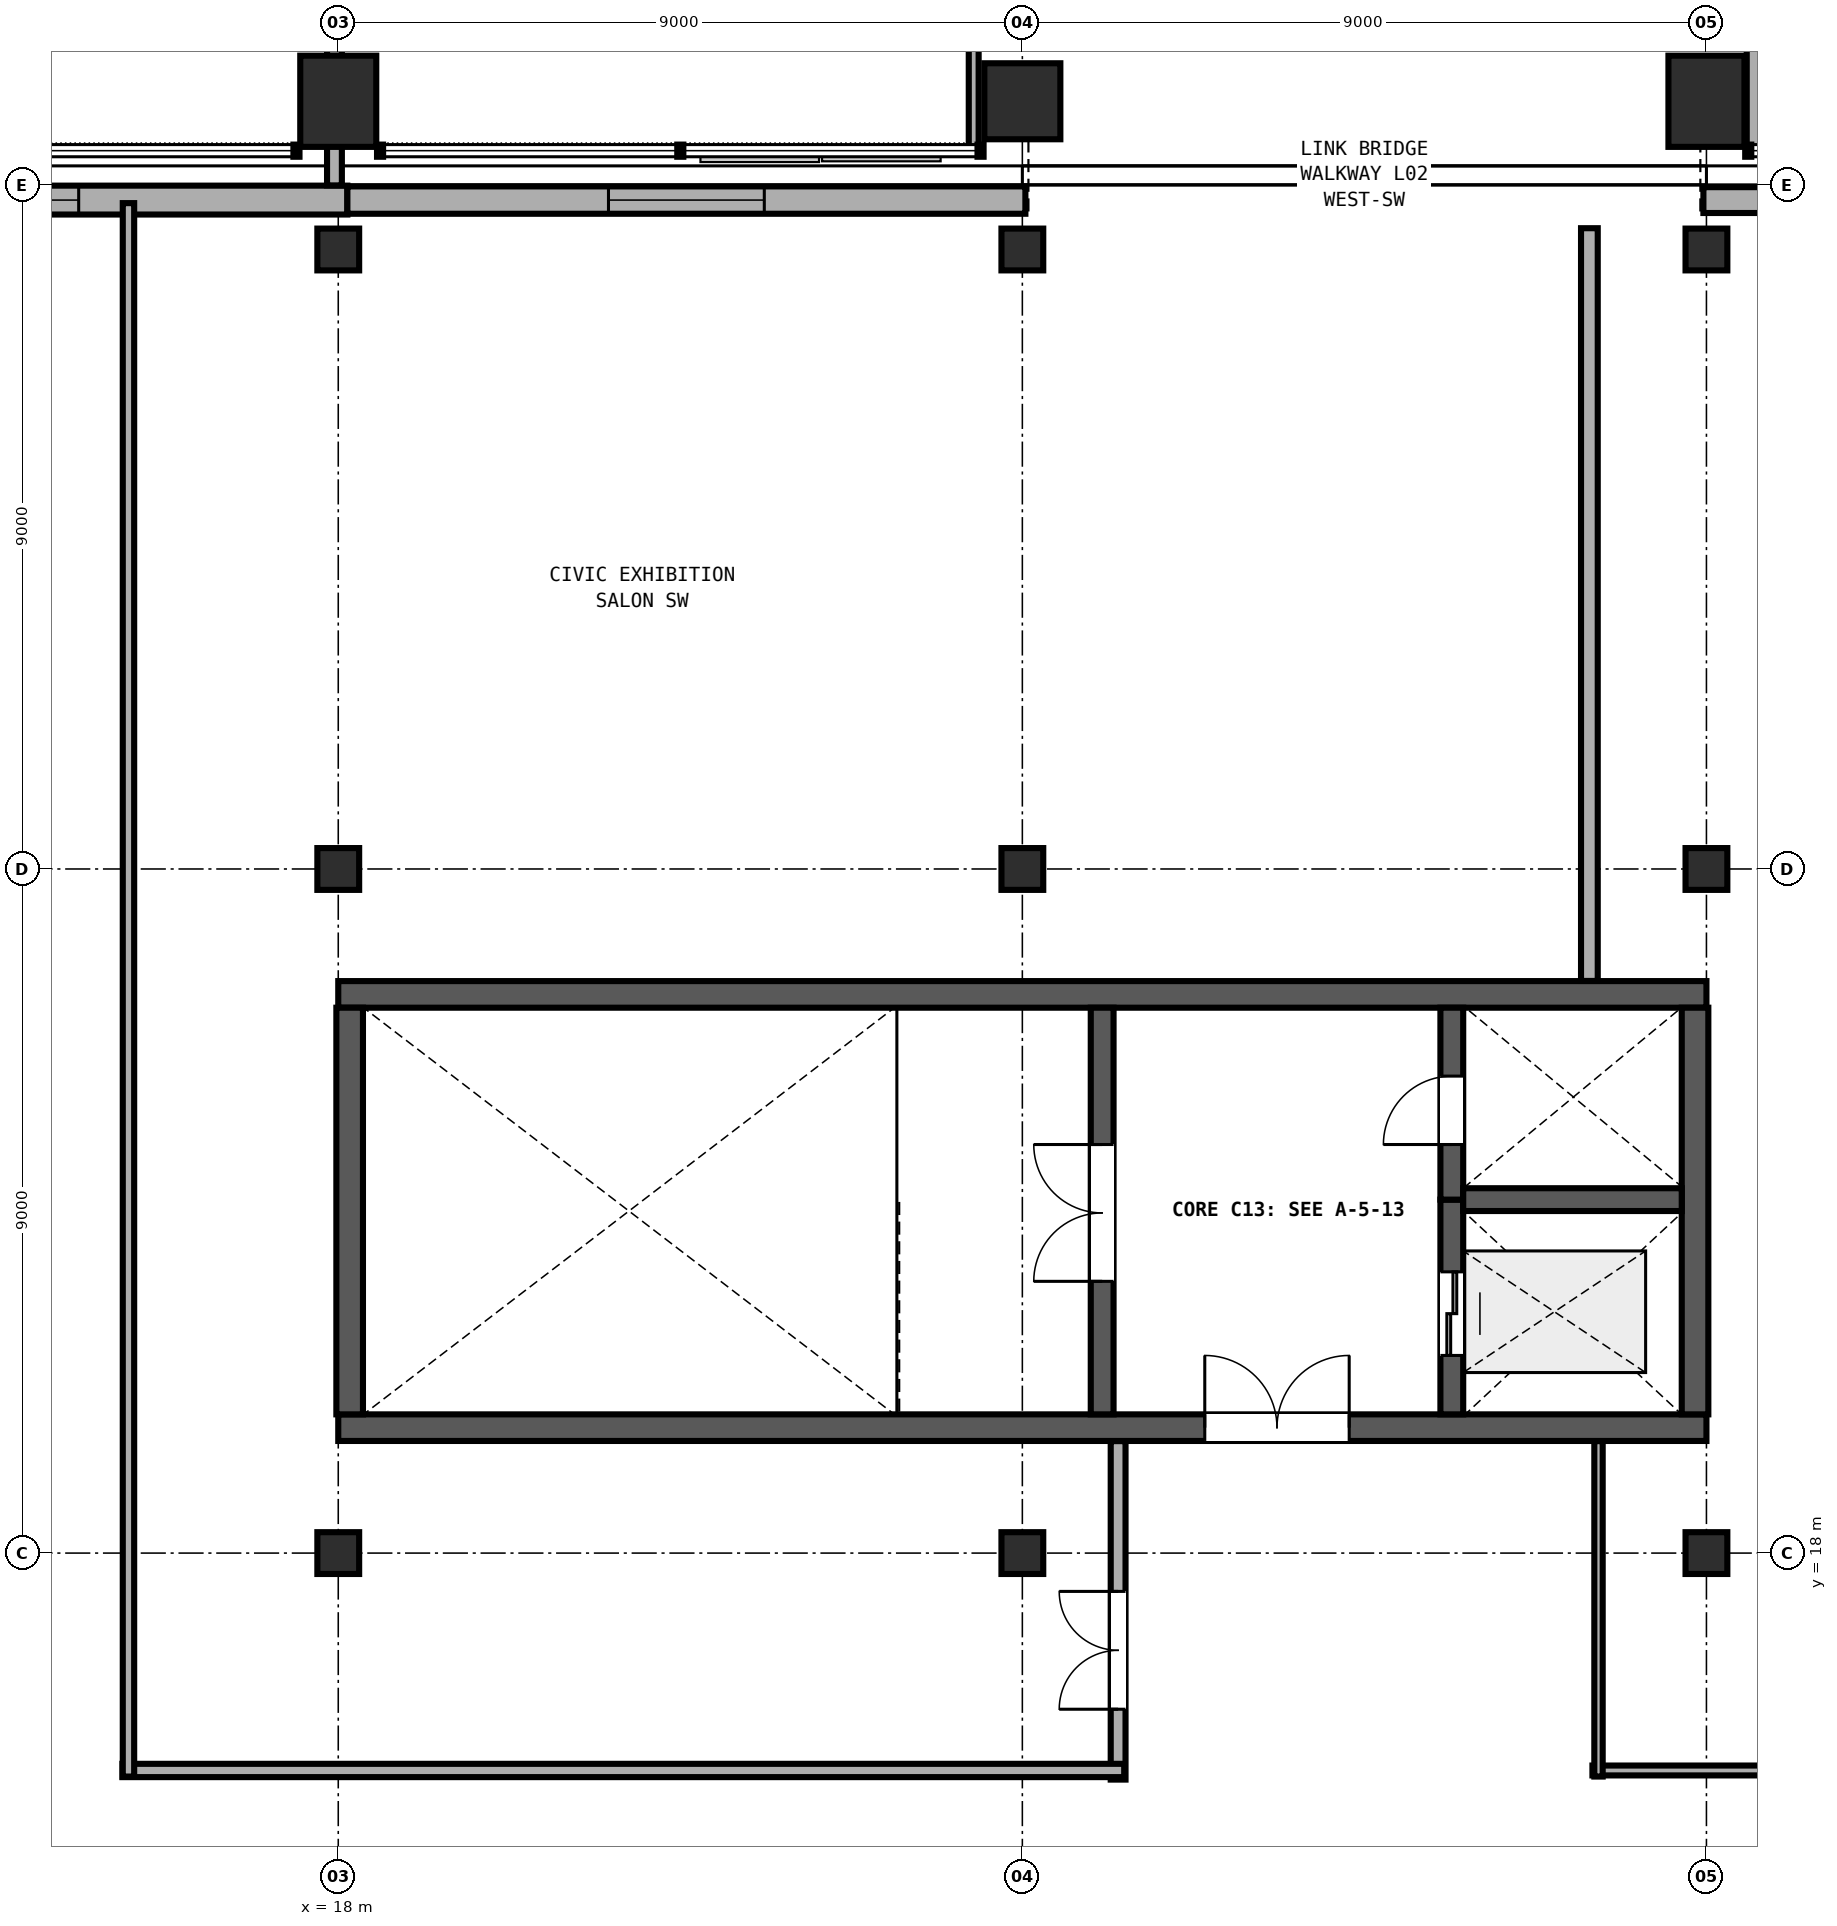
"""IFC4 building model, lengths in metres.
Left out: names, types, materials, properties, quantities, classifications, styles, units other than length and angle.
Written with IfcOpenShell. Run it as: python <this file> out.ifc"""

import sys

from ifc_helpers import new_model, si_unit, direction, frame, frame_2d, origin, origin_2d, place, context, subcontext, project, spatial, rectangle, extrude, element, fill, save


model = new_model("IFC4")
c1 = context("Model", 3, precision=1e-05, world=origin(), true_north=direction((0.0, 1.0)))
c2 = subcontext(c1, "Body", "Model", "MODEL_VIEW")
j1 = project(units=[si_unit("LENGTHUNIT", "METRE"), si_unit("PLANEANGLEUNIT", "RADIAN")], contexts=[c1])
p1 = place(None, origin())
s1 = spatial("IfcSite", under=j1, at=p1, CompositionType="ELEMENT")
p2 = place(p1, origin())
s2 = spatial("IfcBuilding", under=s1, at=p2, CompositionType="ELEMENT")
p3 = place(p2, frame((0.0, 0.0, 9.6)))
s3 = spatial("IfcBuildingStorey", under=s2, at=p3, CompositionType="ELEMENT", Elevation=9.6)
p4 = place(p3, frame((18.0, 37.1, 0.0), z_axis=(0.0, 0.0, 1.0), x_axis=(1.0, 0.0, 0.0)))
e1 = element("IfcColumn", 1, at=p4, inside=s3, PredefinedType="COLUMN", context=c2, shape_type="SweptSolid", body=[
    extrude(rectangle(XDim=1.0, YDim=1.2, at=origin_2d()), origin(), (0.0, 0.0, 1.0), 4.8),
])
p5 = place(p3, frame((27.0, 37.1, 0.0), z_axis=(0.0, 0.0, 1.0), x_axis=(1.0, 0.0, 0.0)))
e2 = element("IfcColumn", 2, at=p5, inside=s3, PredefinedType="COLUMN", context=c2, shape_type="SweptSolid", body=[
    extrude(rectangle(XDim=1.0, YDim=1.0, at=origin_2d()), origin(), (0.0, 0.0, 1.0), 4.8),
])
p6 = place(p3, frame((36.0, 37.1, 0.0), z_axis=(0.0, 0.0, 1.0), x_axis=(1.0, 0.0, 0.0)))
e3 = element("IfcColumn", 3, at=p6, inside=s3, PredefinedType="COLUMN", context=c2, shape_type="SweptSolid", body=[
    extrude(rectangle(XDim=1.0, YDim=1.2, at=origin_2d()), origin(), (0.0, 0.0, 1.0), 4.8),
])
for number, where, z_axis, x_axis in (
    (4, (18.0, 18.0, 0.0), (0.0, 0.0, 1.0), (1.0, 0.0, 0.0)),
    (5, (18.0, 27.0, 0.0), (0.0, 0.0, 1.0), (1.0, 0.0, 0.0)),
    (6, (18.0, 35.15, 0.0), (0.0, 0.0, 1.0), (1.0, 0.0, 0.0)),
    (7, (27.0, 18.0, 0.0), (0.0, 0.0, 1.0), (1.0, 0.0, 0.0)),
    (8, (27.0, 27.0, 0.0), (0.0, 0.0, 1.0), (1.0, 0.0, 0.0)),
    (9, (27.0, 35.15, 0.0), (0.0, 0.0, 1.0), (1.0, 0.0, 0.0)),
    (10, (36.0, 18.0, 0.0), (0.0, 0.0, 1.0), (1.0, 0.0, 0.0)),
    (11, (36.0, 27.0, 0.0), (0.0, 0.0, 1.0), (1.0, 0.0, 0.0)),
    (12, (36.0, 35.15, 0.0), (0.0, 0.0, 1.0), (1.0, 0.0, 0.0)),
):
    element("IfcColumn", number, at=place(p3, frame(where, z_axis=z_axis, x_axis=x_axis)), inside=s3, PredefinedType="COLUMN", context=c2, shape_type="SweptSolid", body=[
        extrude(rectangle(XDim=0.55, YDim=0.55, at=origin_2d()), origin(), (0.0, 0.0, 1.0), 4.8),
    ])
p7 = place(p3, frame((18.0, 19.65, 0.0), z_axis=(0.0, 0.0, 1.0), x_axis=(1.0, 0.0, 0.0)))
e13 = element("IfcWall", 13, at=p7, inside=s3, PredefinedType="SHEAR", context=c2, shape_type="SweptSolid", body=[
    extrude(rectangle(XDim=18.0, YDim=0.35, at=frame_2d((9.0, 0.0))), origin(), (0.0, 0.0, 1.0), 4.555),
])
p8 = place(p7, frame((11.4, 0.0, 0.0)))
e14 = element("IfcOpeningElement", 14, at=p8, cuts=e13, PredefinedType="OPENING", context=c2, shape_type="SweptSolid", body=[
    extrude(rectangle(XDim=1.9, YDim=2.25, at=frame_2d((0.95, 1.125))), frame((0.0, 0.185, 0.0), z_axis=(0.0, -1.0, 0.0), x_axis=(1.0, 0.0, 0.0)), (0.0, 0.0, 1.0), 0.37),
])
p9 = place(p3, frame((36.0, 25.35, 0.0), z_axis=(0.0, 0.0, 1.0), x_axis=(-1.0, 0.0, 0.0)))
e15 = element("IfcWall", 15, at=p9, inside=s3, PredefinedType="SHEAR", context=c2, shape_type="SweptSolid", body=[
    extrude(rectangle(XDim=18.0, YDim=0.35, at=frame_2d((9.0, 0.0))), origin(), (0.0, 0.0, 1.0), 4.555),
])
for number, where, z_axis, x_axis in (
    (16, (18.15, 25.175, 0.0), (0.0, 0.0, 1.0), (0.0, -1.0, 0.0)),
    (17, (35.85, 19.825, 0.0), (0.0, 0.0, 1.0), (0.0, 1.0, 0.0)),
):
    element("IfcWall", number, at=place(p3, frame(where, z_axis=z_axis, x_axis=x_axis)), inside=s3, PredefinedType="SHEAR", context=c2, shape_type="SweptSolid", body=[
        extrude(rectangle(XDim=5.35, YDim=0.35, at=frame_2d((2.675, 0.0))), origin(), (0.0, 0.0, 1.0), 4.555),
    ])
p10 = place(p3, frame((28.05, 19.825, 0.0), z_axis=(0.0, 0.0, 1.0), x_axis=(0.0, 1.0, 0.0)))
e18 = element("IfcWall", 18, at=p10, inside=s3, PredefinedType="SHEAR", context=c2, shape_type="SweptSolid", body=[
    extrude(rectangle(XDim=5.35, YDim=0.3, at=frame_2d((2.675, 0.0))), origin(), (0.0, 0.0, 1.0), 4.555),
])
p11 = place(p10, frame((1.75, 0.0, 0.0)))
e19 = element("IfcOpeningElement", 19, at=p11, cuts=e18, PredefinedType="OPENING", context=c2, shape_type="SweptSolid", body=[
    extrude(rectangle(XDim=1.8, YDim=2.25, at=frame_2d((0.9, 1.125))), frame((0.0, 0.16, 0.0), z_axis=(0.0, -1.0, 0.0), x_axis=(1.0, 0.0, 0.0)), (0.0, 0.0, 1.0), 0.32),
])
p12 = place(p3, frame((32.65, 19.825, 0.0), z_axis=(0.0, 0.0, 1.0), x_axis=(0.0, 1.0, 0.0)))
e20 = element("IfcWall", 20, at=p12, inside=s3, PredefinedType="SHEAR", context=c2, shape_type="SweptSolid", body=[
    extrude(rectangle(XDim=2.825, YDim=0.3, at=frame_2d((1.413, 0.0))), origin(), (0.0, 0.0, 1.0), 4.555),
])
p13 = place(p12, frame((0.775, 0.0, 0.0)))
e21 = element("IfcOpeningElement", 21, at=p13, cuts=e20, PredefinedType="OPENING", context=c2, shape_type="SweptSolid", body=[
    extrude(rectangle(XDim=1.1, YDim=2.1, at=frame_2d((0.55, 1.05))), frame((0.0, 0.16, 0.0), z_axis=(0.0, -1.0, 0.0), x_axis=(1.0, 0.0, 0.0)), (0.0, 0.0, 1.0), 0.32),
])
p14 = place(p3, frame((32.65, 22.65, 0.0), z_axis=(0.0, 0.0, 1.0), x_axis=(0.0, 1.0, 0.0)))
e22 = element("IfcWall", 22, at=p14, inside=s3, PredefinedType="SHEAR", context=c2, shape_type="SweptSolid", body=[
    extrude(rectangle(XDim=2.525, YDim=0.3, at=frame_2d((1.263, 0.0))), origin(), (0.0, 0.0, 1.0), 4.555),
])
p15 = place(p14, frame((0.725, 0.0, 0.0)))
e23 = element("IfcOpeningElement", 23, at=p15, cuts=e22, PredefinedType="OPENING", context=c2, shape_type="SweptSolid", body=[
    extrude(rectangle(XDim=0.9, YDim=2.1, at=frame_2d((0.45, 1.05))), frame((0.0, 0.16, 0.0), z_axis=(0.0, -1.0, 0.0), x_axis=(1.0, 0.0, 0.0)), (0.0, 0.0, 1.0), 0.32),
])
p16 = place(p3, frame((32.8, 22.65, 0.0), z_axis=(0.0, 0.0, 1.0), x_axis=(1.0, 0.0, 0.0)))
e24 = element("IfcWall", 24, at=p16, inside=s3, PredefinedType="SHEAR", context=c2, shape_type="SweptSolid", body=[
    extrude(rectangle(XDim=2.875, YDim=0.3, at=frame_2d((1.438, 0.0))), origin(), (0.0, 0.0, 1.0), 4.555),
])
p17 = place(p3, frame((9.2, 35.8, 0.0), z_axis=(0.0, 0.0, 1.0), x_axis=(1.0, 0.0, 0.0)))
e25 = element("IfcWall", 25, at=p17, inside=s3, PredefinedType="SOLIDWALL", context=c2, shape_type="SweptSolid", body=[
    extrude(rectangle(XDim=8.92, YDim=0.38, at=frame_2d((4.46, 0.0))), origin(), (0.0, 0.0, 1.0), 3.58),
])
p18 = place(p17, frame((3.535, 0.0, 0.9)))
e26 = element("IfcOpeningElement", 26, at=p18, cuts=e25, PredefinedType="OPENING", context=c2, shape_type="SweptSolid", body=[
    extrude(rectangle(XDim=1.85, YDim=1.95, at=frame_2d((0.925, 0.975))), frame((0.0, 0.2, 0.0), z_axis=(0.0, -1.0, 0.0), x_axis=(1.0, 0.0, 0.0)), (0.0, 0.0, 1.0), 0.4),
])
p19 = place(p3, frame((18.12, 35.8, 0.0), z_axis=(0.0, 0.0, 1.0), x_axis=(1.0, 0.0, 0.0)))
e27 = element("IfcWall", 27, at=p19, inside=s3, PredefinedType="SOLIDWALL", context=c2, shape_type="SweptSolid", body=[
    extrude(rectangle(XDim=8.92, YDim=0.36, at=frame_2d((4.46, 0.0))), origin(), (0.0, 0.0, 1.0), 3.58),
])
p20 = place(p19, frame((3.435, 0.0, 0.9)))
e28 = element("IfcOpeningElement", 28, at=p20, cuts=e27, PredefinedType="OPENING", context=c2, shape_type="SweptSolid", body=[
    extrude(rectangle(XDim=2.05, YDim=2.0, at=frame_2d((1.025, 1.0))), frame((0.0, 0.19, 0.0), z_axis=(0.0, -1.0, 0.0), x_axis=(1.0, 0.0, 0.0)), (0.0, 0.0, 1.0), 0.38),
])
p21 = place(p3, frame((35.96, 35.8, 0.0), z_axis=(0.0, 0.0, 1.0), x_axis=(1.0, 0.0, 0.0)))
e29 = element("IfcWall", 29, at=p21, inside=s3, PredefinedType="SOLIDWALL", context=c2, shape_type="SweptSolid", body=[
    extrude(rectangle(XDim=8.92, YDim=0.34, at=frame_2d((4.46, 0.0))), origin(), (0.0, 0.0, 1.0), 3.58),
])
p22 = place(p21, frame((3.335, 0.0, 0.9)))
e30 = element("IfcOpeningElement", 30, at=p22, cuts=e29, PredefinedType="OPENING", context=c2, shape_type="SweptSolid", body=[
    extrude(rectangle(XDim=2.25, YDim=2.05, at=frame_2d((1.125, 1.025))), frame((0.0, 0.18, 0.0), z_axis=(0.0, -1.0, 0.0), x_axis=(1.0, 0.0, 0.0)), (0.0, 0.0, 1.0), 0.36),
])
p23 = place(p3, frame((17.95, 53.173, 0.0), z_axis=(0.0, 0.0, 1.0), x_axis=(0.0, -1.0, 0.0)))
e31 = element("IfcWall", 31, at=p23, inside=s3, PredefinedType="PARTITIONING", context=c2, shape_type="SweptSolid", body=[
    extrude(rectangle(XDim=17.18, YDim=0.195, at=frame_2d((8.59, 0.0))), origin(), (0.0, 0.0, 1.0), 3.56),
])
p24 = place(p3, frame((26.36, 39.5, 0.0), z_axis=(0.0, 0.0, 1.0), x_axis=(0.0, -1.0, 0.0)))
e32 = element("IfcWall", 32, at=p24, inside=s3, PredefinedType="PARTITIONING", context=c2, shape_type="SweptSolid", body=[
    extrude(rectangle(XDim=3.01, YDim=0.13, at=frame_2d((1.505, 0.0))), origin(), (0.0, 0.0, 1.0), 3.56),
])
p25 = place(p3, frame((36.64, 36.49, 0.0), z_axis=(0.0, 0.0, 1.0), x_axis=(0.0, 1.0, 0.0)))
e33 = element("IfcWall", 33, at=p25, inside=s3, PredefinedType="PARTITIONING", context=c2, shape_type="SweptSolid", body=[
    extrude(rectangle(XDim=3.01, YDim=0.22, at=frame_2d((1.505, 0.0))), origin(), (0.0, 0.0, 1.0), 3.56),
])
p26 = place(p3, frame((50.67, 15.14, 0.0), z_axis=(0.0, 0.0, 1.0), x_axis=(-1.0, 0.0, 0.0)))
e34 = element("IfcWall", 34, at=p26, inside=s3, PredefinedType="PARTITIONING", context=c2, shape_type="SweptSolid", body=[
    extrude(rectangle(XDim=16.17, YDim=0.13, at=frame_2d((8.085, 0.0))), origin(), (0.0, 0.0, 1.0), 3.56),
])
p27 = place(p3, frame((34.58, 15.06, 0.0), z_axis=(0.0, 0.0, 1.0), x_axis=(0.0, 1.0, 0.0)))
e35 = element("IfcWall", 35, at=p27, inside=s3, PredefinedType="PARTITIONING", context=c2, shape_type="SweptSolid", body=[
    extrude(rectangle(XDim=4.413, YDim=0.11, at=frame_2d((2.207, 0.0))), origin(), (0.0, 0.0, 1.0), 3.56),
])
p28 = place(p3, frame((34.46, 25.527, 0.0), z_axis=(0.0, 0.0, 1.0), x_axis=(0.0, 1.0, 0.0)))
e36 = element("IfcWall", 36, at=p28, inside=s3, PredefinedType="PARTITIONING", context=c2, shape_type="SweptSolid", body=[
    extrude(rectangle(XDim=9.903, YDim=0.22, at=frame_2d((4.951, 0.0))), origin(), (0.0, 0.0, 1.0), 3.56),
])
p29 = place(p3, frame((28.26, 15.02, 0.0), z_axis=(0.0, 0.0, 1.0), x_axis=(0.0, 1.0, 0.0)))
e37 = element("IfcWall", 37, at=p29, inside=s3, PredefinedType="PARTITIONING", context=c2, shape_type="SweptSolid", body=[
    extrude(rectangle(XDim=4.453, YDim=0.195, at=frame_2d((2.227, 0.0))), origin(), (0.0, 0.0, 1.0), 3.56),
])
p30 = place(p29, frame((0.926, 0.0, 0.0)))
e38 = element("IfcOpeningElement", 38, at=p30, cuts=e37, PredefinedType="OPENING", context=c2, shape_type="SweptSolid", body=[
    extrude(rectangle(XDim=1.55, YDim=2.2, at=frame_2d((0.775, 1.1))), frame((0.0, 0.107, 0.0), z_axis=(0.0, -1.0, 0.0), x_axis=(1.0, 0.0, 0.0)), (0.0, 0.0, 1.0), 0.215),
])
p31 = place(p3, frame((28.34, 15.14, 0.0), z_axis=(0.0, 0.0, 1.0), x_axis=(-1.0, 0.0, 0.0)))
e39 = element("IfcWall", 39, at=p31, inside=s3, PredefinedType="PARTITIONING", context=c2, shape_type="SweptSolid", body=[
    extrude(rectangle(XDim=13.18, YDim=0.175, at=frame_2d((6.59, 0.0))), origin(), (0.0, 0.0, 1.0), 3.56),
])
p32 = place(p3, frame((15.24, 15.06, 0.0), z_axis=(0.0, 0.0, 1.0), x_axis=(0.0, 1.0, 0.0)))
e40 = element("IfcWall", 40, at=p32, inside=s3, PredefinedType="PARTITIONING", context=c2, shape_type="SweptSolid", body=[
    extrude(rectangle(XDim=20.7, YDim=0.15, at=frame_2d((10.35, 0.0))), origin(), (0.0, 0.0, 1.0), 3.56),
])
p33 = place(p18, origin())
e41 = element("IfcWindow", 41, at=p33, inside=s3, PartitioningType="DOUBLE_PANEL_VERTICAL", PredefinedType="WINDOW", context=c2, shape_type="SweptSolid", body=[
    extrude(rectangle(XDim=1.85, YDim=1.95, at=frame_2d((0.925, 0.975))), frame((0.0, 0.03, 0.0), z_axis=(0.0, -1.0, 0.0), x_axis=(1.0, 0.0, 0.0)), (0.0, 0.0, 1.0), 0.06),
])
fill(e26, e41)
p34 = place(p20, origin())
e42 = element("IfcWindow", 42, at=p34, inside=s3, PartitioningType="DOUBLE_PANEL_VERTICAL", PredefinedType="WINDOW", context=c2, shape_type="SweptSolid", body=[
    extrude(rectangle(XDim=2.05, YDim=2.0, at=frame_2d((1.025, 1.0))), frame((0.0, 0.03, 0.0), z_axis=(0.0, -1.0, 0.0), x_axis=(1.0, 0.0, 0.0)), (0.0, 0.0, 1.0), 0.06),
])
fill(e28, e42)
p35 = place(p11, origin())
e43 = element("IfcDoor", 43, at=p35, inside=s3, OperationType="DOUBLE_DOOR_SINGLE_SWING", PredefinedType="DOOR", context=c2, shape_type="SweptSolid", body=[
    extrude(rectangle(XDim=1.8, YDim=2.25, at=frame_2d((0.9, 1.125))), frame((0.0, 0.025, 0.0), z_axis=(0.0, -1.0, 0.0), x_axis=(1.0, 0.0, 0.0)), (0.0, 0.0, 1.0), 0.05),
])
fill(e19, e43)
p36 = place(p15, origin())
e44 = element("IfcDoor", 44, at=p36, inside=s3, OperationType="SINGLE_SWING_LEFT", PredefinedType="DOOR", context=c2, shape_type="SweptSolid", body=[
    extrude(rectangle(XDim=0.9, YDim=2.1, at=frame_2d((0.45, 1.05))), frame((0.0, 0.025, 0.0), z_axis=(0.0, -1.0, 0.0), x_axis=(1.0, 0.0, 0.0)), (0.0, 0.0, 1.0), 0.05),
])
fill(e23, e44)
p37 = place(p13, origin())
e45 = element("IfcDoor", 45, at=p37, inside=s3, OperationType="DOUBLE_DOOR_SLIDING", PredefinedType="DOOR", context=c2, shape_type="SweptSolid", body=[
    extrude(rectangle(XDim=1.1, YDim=2.1, at=frame_2d((0.55, 1.05))), frame((0.0, 0.025, 0.0), z_axis=(0.0, -1.0, 0.0), x_axis=(1.0, 0.0, 0.0)), (0.0, 0.0, 1.0), 0.05),
])
fill(e21, e45)
p38 = place(p8, origin())
e46 = element("IfcDoor", 46, at=p38, inside=s3, OperationType="DOUBLE_DOOR_SINGLE_SWING", PredefinedType="DOOR", context=c2, shape_type="SweptSolid", body=[
    extrude(rectangle(XDim=1.9, YDim=2.25, at=frame_2d((0.95, 1.125))), frame((0.0, 0.025, 0.0), z_axis=(0.0, -1.0, 0.0), x_axis=(1.0, 0.0, 0.0)), (0.0, 0.0, 1.0), 0.05),
])
fill(e14, e46)
p39 = place(p30, origin())
e47 = element("IfcDoor", 47, at=p39, inside=s3, OperationType="DOUBLE_DOOR_SINGLE_SWING", PredefinedType="DOOR", context=c2, shape_type="SweptSolid", body=[
    extrude(rectangle(XDim=1.55, YDim=2.2, at=frame_2d((0.775, 1.1))), frame((0.0, 0.025, 0.0), z_axis=(0.0, -1.0, 0.0), x_axis=(1.0, 0.0, 0.0)), (0.0, 0.0, 1.0), 0.05),
])
fill(e38, e47)
save(model, sys.argv[1])
